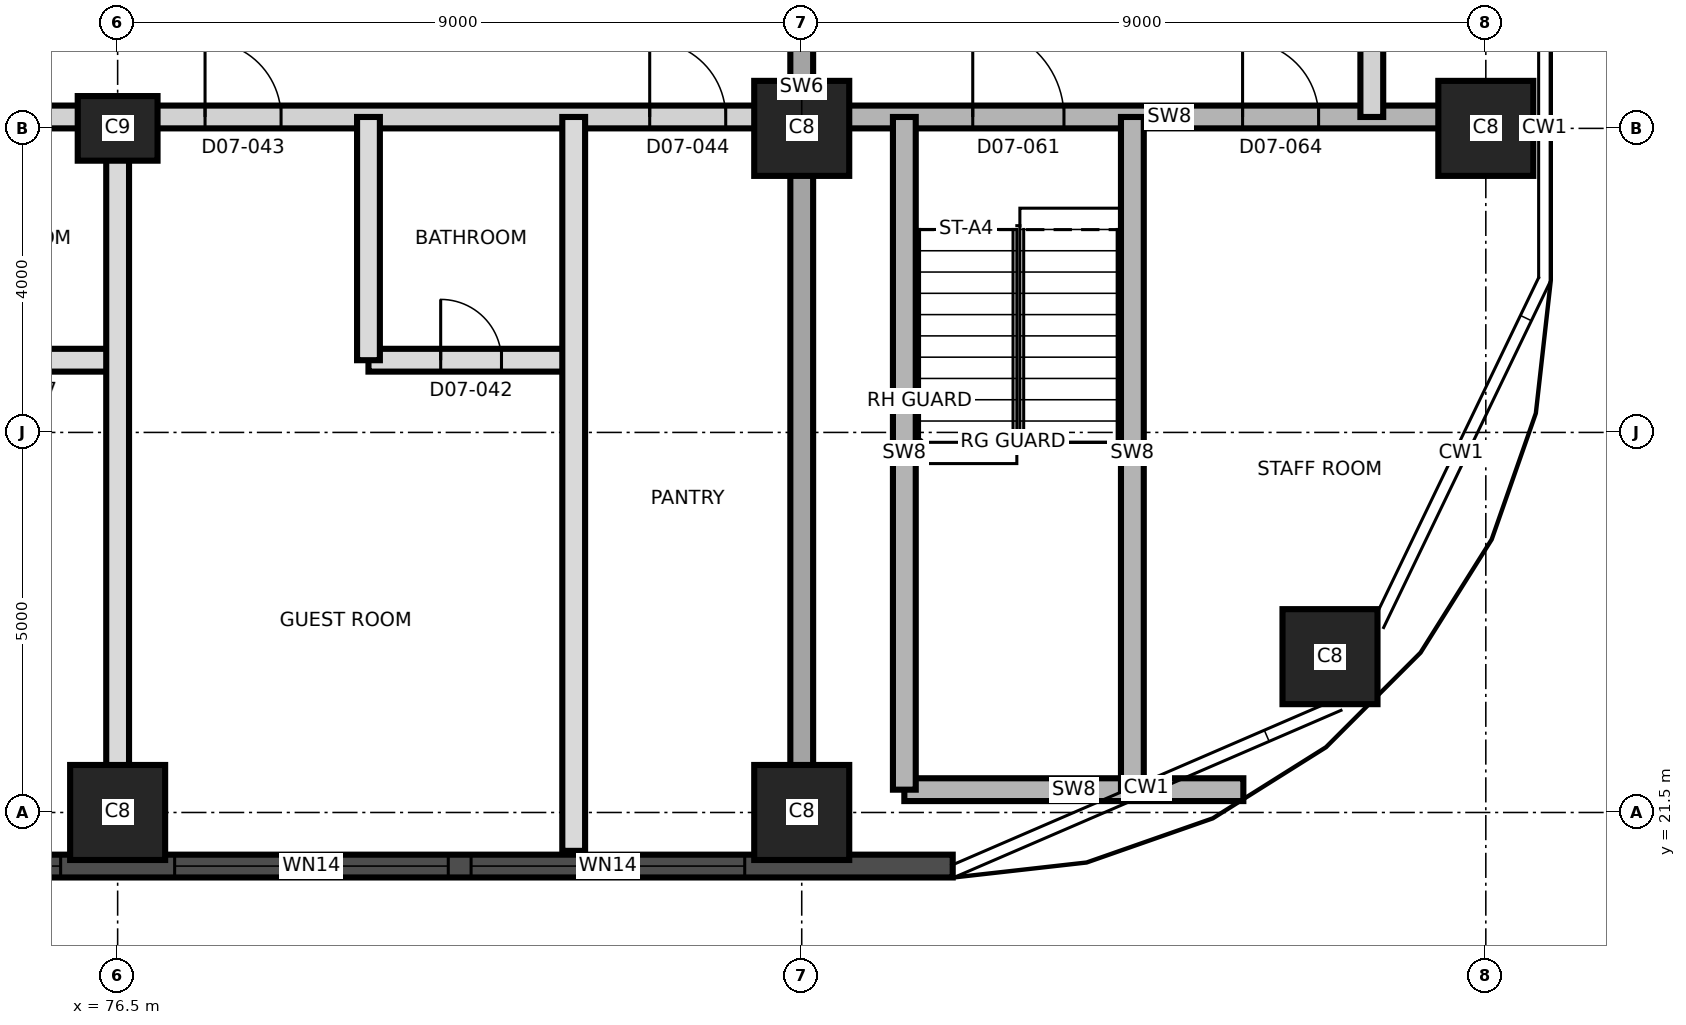
"""IFC4 building model, lengths in metres.
Left out: names, types, materials, properties, quantities, classifications, styles, units other than length and angle.
Written with IfcOpenShell. Run it as: python <this file> out.ifc"""

import sys

from ifc_helpers import new_model, si_unit, direction, frame, frame_2d, origin, origin_2d, place, context, subcontext, project, spatial, rectangle, extrude, element, fill, save


model = new_model("IFC4")
c1 = context("Model", 3, precision=1e-05, world=origin(), true_north=direction((0.0, 1.0)))
c2 = subcontext(c1, "Body", "Model", "MODEL_VIEW")
j1 = project(units=[si_unit("LENGTHUNIT", "METRE"), si_unit("PLANEANGLEUNIT", "RADIAN")], contexts=[c1])
p1 = place(None, origin())
s1 = spatial("IfcSite", under=j1, at=p1, CompositionType="ELEMENT")
p2 = place(p1, origin())
s2 = spatial("IfcBuilding", under=s1, at=p2, CompositionType="ELEMENT")
p3 = place(p2, frame((0.0, 0.0, 87.1)))
s3 = spatial("IfcBuildingStorey", under=s2, at=p3, CompositionType="ELEMENT", Elevation=87.1)
for number, where, z_axis, x_axis in (
    (1, (76.5, 21.5, 0.0), (0.0, 0.0, 1.0), (1.0, 0.0, 0.0)),
    (2, (85.5, 21.5, 0.0), (0.0, 0.0, 1.0), (1.0, 0.0, 0.0)),
    (3, (92.45, 23.55, 0.0), (0.0, 0.0, 1.0), (1.0, 0.0, 0.0)),
):
    element("IfcColumn", number, at=place(p3, frame(where, z_axis=z_axis, x_axis=x_axis)), inside=s3, PredefinedType="COLUMN", context=c2, shape_type="SweptSolid", body=[
        extrude(rectangle(XDim=1.25, YDim=1.25, at=origin_2d()), origin(), (0.0, 0.0, 1.0), 3.7),
    ])
p4 = place(p3, frame((76.5, 30.5, 0.0), z_axis=(0.0, 0.0, 1.0), x_axis=(1.0, 0.0, 0.0)))
e4 = element("IfcColumn", 4, at=p4, inside=s3, PredefinedType="COLUMN", context=c2, shape_type="SweptSolid", body=[
    extrude(rectangle(XDim=1.05, YDim=0.85, at=origin_2d()), origin(), (0.0, 0.0, 1.0), 3.7),
])
for number, where, z_axis, x_axis in (
    (5, (85.5, 30.5, 0.0), (0.0, 0.0, 1.0), (1.0, 0.0, 0.0)),
    (6, (94.5, 30.5, 0.0), (0.0, 0.0, 1.0), (1.0, 0.0, 0.0)),
):
    element("IfcColumn", number, at=place(p3, frame(where, z_axis=z_axis, x_axis=x_axis)), inside=s3, PredefinedType="COLUMN", context=c2, shape_type="SweptSolid", body=[
        extrude(rectangle(XDim=1.25, YDim=1.25, at=origin_2d()), origin(), (0.0, 0.0, 1.0), 3.7),
    ])
p5 = place(p3, frame((85.5, 20.995, 0.0), z_axis=(0.0, 0.0, 1.0), x_axis=(0.0, 1.0, 0.0)))
e7 = element("IfcWall", 7, at=p5, inside=s3, PredefinedType="SHEAR", context=c2, shape_type="SweptSolid", body=[
    extrude(rectangle(XDim=19.01, YDim=0.3, at=frame_2d((9.505, 0.0))), origin(), (0.0, 0.0, 1.0), 3.7),
])
p6 = place(p5, frame((10.705, 0.0, 0.0)))
e8 = element("IfcOpeningElement", 8, at=p6, cuts=e7, PredefinedType="OPENING", context=c2, shape_type="SweptSolid", body=[
    extrude(rectangle(XDim=1.4, YDim=2.1, at=frame_2d((0.7, 1.05))), frame((0.0, 0.16, 0.0), z_axis=(0.0, -1.0, 0.0), x_axis=(1.0, 0.0, 0.0)), (0.0, 0.0, 1.0), 0.32),
])
p7 = place(p3, frame((44.011, 20.795, 0.0), z_axis=(0.0, 0.0, 1.0), x_axis=(1.0, 0.0, 0.0)))
e9 = element("IfcWall", 9, at=p7, inside=s3, PredefinedType="SOLIDWALL", context=c2, shape_type="SweptSolid", body=[
    extrude(rectangle(XDim=43.476, YDim=0.3, at=frame_2d((21.738, 0.0))), origin(), (0.0, 0.0, 1.0), 3.4),
])
p8 = place(p7, frame((1.845, 0.0, 0.3)))
e10 = element("IfcOpeningElement", 10, at=p8, cuts=e9, PredefinedType="OPENING", context=c2, shape_type="SweptSolid", body=[
    extrude(rectangle(XDim=1.8, YDim=2.4, at=frame_2d((0.9, 1.2))), frame((0.0, 0.16, 0.0), z_axis=(0.0, -1.0, 0.0), x_axis=(1.0, 0.0, 0.0)), (0.0, 0.0, 1.0), 0.32),
])
p9 = place(p7, frame((5.639, 0.0, 0.9)))
e11 = element("IfcOpeningElement", 11, at=p9, cuts=e9, PredefinedType="OPENING", context=c2, shape_type="SweptSolid", body=[
    extrude(rectangle(XDim=4.2, YDim=1.7, at=frame_2d((2.1, 0.85))), frame((0.0, 0.16, 0.0), z_axis=(0.0, -1.0, 0.0), x_axis=(1.0, 0.0, 0.0)), (0.0, 0.0, 1.0), 0.32),
])
p10 = place(p7, frame((10.139, 0.0, 0.9)))
e12 = element("IfcOpeningElement", 12, at=p10, cuts=e9, PredefinedType="OPENING", context=c2, shape_type="SweptSolid", body=[
    extrude(rectangle(XDim=4.2, YDim=1.7, at=frame_2d((2.1, 0.85))), frame((0.0, 0.16, 0.0), z_axis=(0.0, -1.0, 0.0), x_axis=(1.0, 0.0, 0.0)), (0.0, 0.0, 1.0), 0.32),
])
p11 = place(p7, frame((14.639, 0.0, 0.9)))
e13 = element("IfcOpeningElement", 13, at=p11, cuts=e9, PredefinedType="OPENING", context=c2, shape_type="SweptSolid", body=[
    extrude(rectangle(XDim=4.2, YDim=1.7, at=frame_2d((2.1, 0.85))), frame((0.0, 0.16, 0.0), z_axis=(0.0, -1.0, 0.0), x_axis=(1.0, 0.0, 0.0)), (0.0, 0.0, 1.0), 0.32),
])
p12 = place(p7, frame((19.139, 0.0, 0.9)))
e14 = element("IfcOpeningElement", 14, at=p12, cuts=e9, PredefinedType="OPENING", context=c2, shape_type="SweptSolid", body=[
    extrude(rectangle(XDim=3.6, YDim=1.7, at=frame_2d((1.8, 0.85))), frame((0.0, 0.16, 0.0), z_axis=(0.0, -1.0, 0.0), x_axis=(1.0, 0.0, 0.0)), (0.0, 0.0, 1.0), 0.32),
])
p13 = place(p7, frame((24.239, 0.0, 0.9)))
e15 = element("IfcOpeningElement", 15, at=p13, cuts=e9, PredefinedType="OPENING", context=c2, shape_type="SweptSolid", body=[
    extrude(rectangle(XDim=3.6, YDim=1.7, at=frame_2d((1.8, 0.85))), frame((0.0, 0.16, 0.0), z_axis=(0.0, -1.0, 0.0), x_axis=(1.0, 0.0, 0.0)), (0.0, 0.0, 1.0), 0.32),
])
p14 = place(p7, frame((28.139, 0.0, 0.9)))
e16 = element("IfcOpeningElement", 16, at=p14, cuts=e9, PredefinedType="OPENING", context=c2, shape_type="SweptSolid", body=[
    extrude(rectangle(XDim=3.6, YDim=1.7, at=frame_2d((1.8, 0.85))), frame((0.0, 0.16, 0.0), z_axis=(0.0, -1.0, 0.0), x_axis=(1.0, 0.0, 0.0)), (0.0, 0.0, 1.0), 0.32),
])
p15 = place(p7, frame((33.239, 0.0, 0.9)))
e17 = element("IfcOpeningElement", 17, at=p15, cuts=e9, PredefinedType="OPENING", context=c2, shape_type="SweptSolid", body=[
    extrude(rectangle(XDim=3.6, YDim=1.7, at=frame_2d((1.8, 0.85))), frame((0.0, 0.16, 0.0), z_axis=(0.0, -1.0, 0.0), x_axis=(1.0, 0.0, 0.0)), (0.0, 0.0, 1.0), 0.32),
])
p16 = place(p7, frame((37.139, 0.0, 0.9)))
e18 = element("IfcOpeningElement", 18, at=p16, cuts=e9, PredefinedType="OPENING", context=c2, shape_type="SweptSolid", body=[
    extrude(rectangle(XDim=3.6, YDim=1.7, at=frame_2d((1.8, 0.85))), frame((0.0, 0.16, 0.0), z_axis=(0.0, -1.0, 0.0), x_axis=(1.0, 0.0, 0.0)), (0.0, 0.0, 1.0), 0.32),
])
p17 = place(p3, frame((86.85, 21.8, 0.0), z_axis=(0.0, 0.0, 1.0), x_axis=(1.0, 0.0, 0.0)))
e19 = element("IfcWall", 19, at=p17, inside=s3, PredefinedType="SHEAR", context=c2, shape_type="SweptSolid", body=[
    extrude(rectangle(XDim=4.46, YDim=0.3, at=frame_2d((2.23, 0.0))), origin(), (0.0, 0.0, 1.0), 3.4),
])
p18 = place(p3, frame((73.8, 27.45, 0.0), z_axis=(0.0, 0.0, 1.0), x_axis=(1.0, 0.0, 0.0)))
e20 = element("IfcWall", 20, at=p18, inside=s3, PredefinedType="PARTITIONING", context=c2, shape_type="SweptSolid", body=[
    extrude(rectangle(XDim=2.7, YDim=0.3, at=frame_2d((1.35, 0.0))), origin(), (0.0, 0.0, 1.0), 3.4),
])
p19 = place(p18, frame((0.95, 0.0, 0.0)))
e21 = element("IfcOpeningElement", 21, at=p19, cuts=e20, PredefinedType="OPENING", context=c2, shape_type="SweptSolid", body=[
    extrude(rectangle(XDim=0.8, YDim=2.1, at=frame_2d((0.4, 1.05))), frame((0.0, 0.16, 0.0), z_axis=(0.0, -1.0, 0.0), x_axis=(1.0, 0.0, 0.0)), (0.0, 0.0, 1.0), 0.32),
])
p20 = place(p3, frame((79.8, 27.45, 0.0), z_axis=(0.0, 0.0, 1.0), x_axis=(1.0, 0.0, 0.0)))
e22 = element("IfcWall", 22, at=p20, inside=s3, PredefinedType="PARTITIONING", context=c2, shape_type="SweptSolid", body=[
    extrude(rectangle(XDim=2.7, YDim=0.3, at=frame_2d((1.35, 0.0))), origin(), (0.0, 0.0, 1.0), 3.4),
])
p21 = place(p20, frame((0.95, 0.0, 0.0)))
e23 = element("IfcOpeningElement", 23, at=p21, cuts=e22, PredefinedType="OPENING", context=c2, shape_type="SweptSolid", body=[
    extrude(rectangle(XDim=0.8, YDim=2.1, at=frame_2d((0.4, 1.05))), frame((0.0, 0.16, 0.0), z_axis=(0.0, -1.0, 0.0), x_axis=(1.0, 0.0, 0.0)), (0.0, 0.0, 1.0), 0.32),
])
p22 = place(p3, frame((58.8, 30.65, 0.0), z_axis=(0.0, 0.0, 1.0), x_axis=(1.0, 0.0, 0.0)))
e24 = element("IfcWall", 24, at=p22, inside=s3, PredefinedType="PARTITIONING", context=c2, shape_type="SweptSolid", body=[
    extrude(rectangle(XDim=26.53, YDim=0.3, at=frame_2d((13.265, 0.0))), origin(), (0.0, 0.0, 1.0), 3.4),
])
p23 = place(p22, frame((3.7, 0.0, 0.0)))
e25 = element("IfcOpeningElement", 25, at=p23, cuts=e24, PredefinedType="OPENING", context=c2, shape_type="SweptSolid", body=[
    extrude(rectangle(XDim=1.0, YDim=2.4, at=frame_2d((0.5, 1.2))), frame((0.0, 0.16, 0.0), z_axis=(0.0, -1.0, 0.0), x_axis=(1.0, 0.0, 0.0)), (0.0, 0.0, 1.0), 0.32),
])
p24 = place(p22, frame((11.8, 0.0, 0.0)))
e26 = element("IfcOpeningElement", 26, at=p24, cuts=e24, PredefinedType="OPENING", context=c2, shape_type="SweptSolid", body=[
    extrude(rectangle(XDim=1.0, YDim=2.1, at=frame_2d((0.5, 1.05))), frame((0.0, 0.16, 0.0), z_axis=(0.0, -1.0, 0.0), x_axis=(1.0, 0.0, 0.0)), (0.0, 0.0, 1.0), 0.32),
])
p25 = place(p22, frame((13.6, 0.0, 0.0)))
e27 = element("IfcOpeningElement", 27, at=p25, cuts=e24, PredefinedType="OPENING", context=c2, shape_type="SweptSolid", body=[
    extrude(rectangle(XDim=1.0, YDim=2.1, at=frame_2d((0.5, 1.05))), frame((0.0, 0.16, 0.0), z_axis=(0.0, -1.0, 0.0), x_axis=(1.0, 0.0, 0.0)), (0.0, 0.0, 1.0), 0.32),
])
p26 = place(p22, frame((18.85, 0.0, 0.0)))
e28 = element("IfcOpeningElement", 28, at=p26, cuts=e24, PredefinedType="OPENING", context=c2, shape_type="SweptSolid", body=[
    extrude(rectangle(XDim=1.0, YDim=2.1, at=frame_2d((0.5, 1.05))), frame((0.0, 0.16, 0.0), z_axis=(0.0, -1.0, 0.0), x_axis=(1.0, 0.0, 0.0)), (0.0, 0.0, 1.0), 0.32),
])
p27 = place(p22, frame((24.7, 0.0, 0.0)))
e29 = element("IfcOpeningElement", 29, at=p27, cuts=e24, PredefinedType="OPENING", context=c2, shape_type="SweptSolid", body=[
    extrude(rectangle(XDim=1.0, YDim=2.1, at=frame_2d((0.5, 1.05))), frame((0.0, 0.16, 0.0), z_axis=(0.0, -1.0, 0.0), x_axis=(1.0, 0.0, 0.0)), (0.0, 0.0, 1.0), 0.32),
])
p28 = place(p3, frame((85.67, 30.65, 0.0), z_axis=(0.0, 0.0, 1.0), x_axis=(1.0, 0.0, 0.0)))
e30 = element("IfcWall", 30, at=p28, inside=s3, PredefinedType="SHEAR", context=c2, shape_type="SweptSolid", body=[
    extrude(rectangle(XDim=9.335, YDim=0.3, at=frame_2d((4.667, 0.0))), origin(), (0.0, 0.0, 1.0), 3.4),
])
p29 = place(p28, frame((2.08, 0.0, 0.0)))
e31 = element("IfcOpeningElement", 31, at=p29, cuts=e30, PredefinedType="OPENING", context=c2, shape_type="SweptSolid", body=[
    extrude(rectangle(XDim=1.2, YDim=2.1, at=frame_2d((0.6, 1.05))), frame((0.0, 0.16, 0.0), z_axis=(0.0, -1.0, 0.0), x_axis=(1.0, 0.0, 0.0)), (0.0, 0.0, 1.0), 0.32),
])
p30 = place(p28, frame((5.63, 0.0, 0.0)))
e32 = element("IfcOpeningElement", 32, at=p30, cuts=e30, PredefinedType="OPENING", context=c2, shape_type="SweptSolid", body=[
    extrude(rectangle(XDim=1.0, YDim=2.1, at=frame_2d((0.5, 1.05))), frame((0.0, 0.16, 0.0), z_axis=(0.0, -1.0, 0.0), x_axis=(1.0, 0.0, 0.0)), (0.0, 0.0, 1.0), 0.32),
])
p31 = place(p3, frame((76.5, 20.995, 0.0), z_axis=(0.0, 0.0, 1.0), x_axis=(0.0, 1.0, 0.0)))
e33 = element("IfcWall", 33, at=p31, inside=s3, PredefinedType="PARTITIONING", context=c2, shape_type="SweptSolid", body=[
    extrude(rectangle(XDim=9.655, YDim=0.3, at=frame_2d((4.827, 0.0))), origin(), (0.0, 0.0, 1.0), 3.4),
])
p32 = place(p3, frame((79.8, 27.45, 0.0), z_axis=(0.0, 0.0, 1.0), x_axis=(0.0, 1.0, 0.0)))
e34 = element("IfcWall", 34, at=p32, inside=s3, PredefinedType="PARTITIONING", context=c2, shape_type="SweptSolid", body=[
    extrude(rectangle(XDim=3.2, YDim=0.3, at=frame_2d((1.6, 0.0))), origin(), (0.0, 0.0, 1.0), 3.4),
])
p33 = place(p3, frame((82.5, 20.995, 0.0), z_axis=(0.0, 0.0, 1.0), x_axis=(0.0, 1.0, 0.0)))
e35 = element("IfcWall", 35, at=p33, inside=s3, PredefinedType="PARTITIONING", context=c2, shape_type="SweptSolid", body=[
    extrude(rectangle(XDim=9.655, YDim=0.3, at=frame_2d((4.827, 0.0))), origin(), (0.0, 0.0, 1.0), 3.4),
])
for number, where, z_axis, x_axis in (
    (36, (86.85, 21.8, 0.0), (0.0, 0.0, 1.0), (0.0, 1.0, 0.0)),
    (37, (89.85, 21.8, 0.0), (0.0, 0.0, 1.0), (0.0, 1.0, 0.0)),
):
    element("IfcWall", number, at=place(p3, frame(where, z_axis=z_axis, x_axis=x_axis)), inside=s3, PredefinedType="SHEAR", context=c2, shape_type="SweptSolid", body=[
        extrude(rectangle(XDim=8.85, YDim=0.3, at=frame_2d((4.425, 0.0))), origin(), (0.0, 0.0, 1.0), 3.4),
    ])
p34 = place(p3, frame((93.0, 30.65, 0.0), z_axis=(0.0, 0.0, 1.0), x_axis=(0.0, 1.0, 0.0)))
e38 = element("IfcWall", 38, at=p34, inside=s3, PredefinedType="PARTITIONING", context=c2, shape_type="SweptSolid", body=[
    extrude(rectangle(XDim=2.7, YDim=0.3, at=frame_2d((1.35, 0.0))), origin(), (0.0, 0.0, 1.0), 3.4),
])
p35 = place(p14, origin())
e39 = element("IfcWindow", 39, at=p35, inside=s3, PartitioningType="SINGLE_PANEL", PredefinedType="WINDOW", context=c2, shape_type="SweptSolid", body=[
    extrude(rectangle(XDim=3.6, YDim=1.7, at=frame_2d((1.8, 0.85))), frame((0.0, 0.03, 0.0), z_axis=(0.0, -1.0, 0.0), x_axis=(1.0, 0.0, 0.0)), (0.0, 0.0, 1.0), 0.06),
])
fill(e16, e39)
p36 = place(p15, origin())
e40 = element("IfcWindow", 40, at=p36, inside=s3, PartitioningType="SINGLE_PANEL", PredefinedType="WINDOW", context=c2, shape_type="SweptSolid", body=[
    extrude(rectangle(XDim=3.6, YDim=1.7, at=frame_2d((1.8, 0.85))), frame((0.0, 0.03, 0.0), z_axis=(0.0, -1.0, 0.0), x_axis=(1.0, 0.0, 0.0)), (0.0, 0.0, 1.0), 0.06),
])
fill(e17, e40)
p37 = place(p16, origin())
e41 = element("IfcWindow", 41, at=p37, inside=s3, PartitioningType="SINGLE_PANEL", PredefinedType="WINDOW", context=c2, shape_type="SweptSolid", body=[
    extrude(rectangle(XDim=3.6, YDim=1.7, at=frame_2d((1.8, 0.85))), frame((0.0, 0.03, 0.0), z_axis=(0.0, -1.0, 0.0), x_axis=(1.0, 0.0, 0.0)), (0.0, 0.0, 1.0), 0.06),
])
fill(e18, e41)
p38 = place(p21, origin())
e42 = element("IfcDoor", 42, at=p38, inside=s3, OperationType="SINGLE_SWING_RIGHT", PredefinedType="DOOR", context=c2, shape_type="SweptSolid", body=[
    extrude(rectangle(XDim=0.8, YDim=2.1, at=frame_2d((0.4, 1.05))), frame((0.0, 0.025, 0.0), z_axis=(0.0, -1.0, 0.0), x_axis=(1.0, 0.0, 0.0)), (0.0, 0.0, 1.0), 0.05),
])
fill(e23, e42)
p39 = place(p26, origin())
e43 = element("IfcDoor", 43, at=p39, inside=s3, OperationType="SINGLE_SWING_LEFT", PredefinedType="DOOR", context=c2, shape_type="SweptSolid", body=[
    extrude(rectangle(XDim=1.0, YDim=2.1, at=frame_2d((0.5, 1.05))), frame((0.0, 0.025, 0.0), z_axis=(0.0, -1.0, 0.0), x_axis=(1.0, 0.0, 0.0)), (0.0, 0.0, 1.0), 0.05),
])
fill(e28, e43)
p40 = place(p27, origin())
e44 = element("IfcDoor", 44, at=p40, inside=s3, OperationType="SINGLE_SWING_LEFT", PredefinedType="DOOR", context=c2, shape_type="SweptSolid", body=[
    extrude(rectangle(XDim=1.0, YDim=2.1, at=frame_2d((0.5, 1.05))), frame((0.0, 0.025, 0.0), z_axis=(0.0, -1.0, 0.0), x_axis=(1.0, 0.0, 0.0)), (0.0, 0.0, 1.0), 0.05),
])
fill(e29, e44)
p41 = place(p29, origin())
e45 = element("IfcDoor", 45, at=p41, inside=s3, OperationType="SINGLE_SWING_LEFT", PredefinedType="DOOR", context=c2, shape_type="SweptSolid", body=[
    extrude(rectangle(XDim=1.2, YDim=2.1, at=frame_2d((0.6, 1.05))), frame((0.0, 0.025, 0.0), z_axis=(0.0, -1.0, 0.0), x_axis=(1.0, 0.0, 0.0)), (0.0, 0.0, 1.0), 0.05),
])
fill(e31, e45)
p42 = place(p30, origin())
e46 = element("IfcDoor", 46, at=p42, inside=s3, OperationType="SINGLE_SWING_LEFT", PredefinedType="DOOR", context=c2, shape_type="SweptSolid", body=[
    extrude(rectangle(XDim=1.0, YDim=2.1, at=frame_2d((0.5, 1.05))), frame((0.0, 0.025, 0.0), z_axis=(0.0, -1.0, 0.0), x_axis=(1.0, 0.0, 0.0)), (0.0, 0.0, 1.0), 0.05),
])
fill(e32, e46)
save(model, sys.argv[1])
